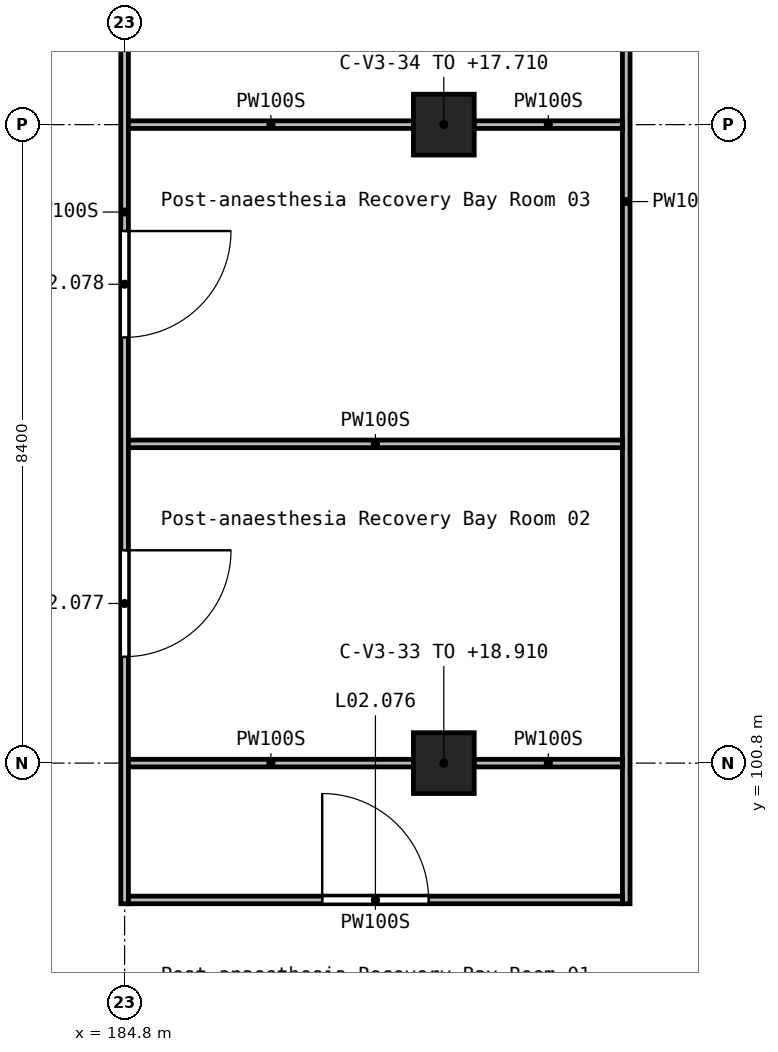
"""IFC4 building model, lengths in metres.
Left out: names, types, materials, properties, quantities, classifications, styles, units other than length and angle.
Written with IfcOpenShell. Run it as: python <this file> out.ifc"""

import sys

from ifc_helpers import new_model, si_unit, direction, frame, frame_2d, origin, origin_2d, place, context, subcontext, project, spatial, rectangle, extrude, element, fill, save


model = new_model("IFC4")
c1 = context("Model", 3, precision=1e-05, world=origin(), true_north=direction((0.0, 1.0)))
c2 = subcontext(c1, "Body", "Model", "MODEL_VIEW")
j1 = project(units=[si_unit("LENGTHUNIT", "METRE"), si_unit("PLANEANGLEUNIT", "RADIAN")], contexts=[c1])
p1 = place(None, origin())
s1 = spatial("IfcSite", under=j1, at=p1, CompositionType="ELEMENT")
p2 = place(p1, origin())
s2 = spatial("IfcBuilding", under=s1, at=p2, CompositionType="ELEMENT")
p3 = place(p2, frame((0.0, 0.0, 12.6)))
s3 = spatial("IfcBuildingStorey", under=s2, at=p3, CompositionType="ELEMENT", Elevation=12.6)
p4 = place(p3, frame((189.0, 100.8, 0.0), z_axis=(0.0, 0.0, 1.0), x_axis=(1.0, 0.0, 0.0)))
e1 = element("IfcColumn", 1, at=p4, inside=s3, PredefinedType="COLUMN", context=c2, shape_type="SweptSolid", body=[
    extrude(rectangle(XDim=0.8, YDim=0.8, at=origin_2d()), origin(), (0.0, 0.0, 1.0), 6.31),
])
p5 = place(p3, frame((189.0, 109.2, 0.0), z_axis=(0.0, 0.0, 1.0), x_axis=(1.0, 0.0, 0.0)))
e2 = element("IfcColumn", 2, at=p5, inside=s3, PredefinedType="COLUMN", context=c2, shape_type="SweptSolid", body=[
    extrude(rectangle(XDim=0.8, YDim=0.8, at=origin_2d()), origin(), (0.0, 0.0, 1.0), 5.11),
])
p6 = place(p3, frame((184.8, 117.15, 0.0), z_axis=(0.0, 0.0, 1.0), x_axis=(0.0, -1.0, 0.0)))
e3 = element("IfcWall", 3, at=p6, inside=s3, PredefinedType="PARTITIONING", context=c2, shape_type="SweptSolid", body=[
    extrude(rectangle(XDim=18.2, YDim=0.1, at=frame_2d((9.1, 0.0))), origin(), (0.0, 0.0, 1.0), 3.85),
])
p7 = place(p6, frame((13.55, 0.0, 0.0)))
e4 = element("IfcOpeningElement", 4, at=p7, cuts=e3, PredefinedType="OPENING", context=c2, shape_type="SweptSolid", body=[
    extrude(rectangle(XDim=1.4, YDim=2.1, at=frame_2d((0.7, 1.05))), frame((0.0, 0.06, 0.0), z_axis=(0.0, -1.0, 0.0), x_axis=(1.0, 0.0, 0.0)), (0.0, 0.0, 1.0), 0.12),
])
p8 = place(p6, frame((9.35, 0.0, 0.0)))
e5 = element("IfcOpeningElement", 5, at=p8, cuts=e3, PredefinedType="OPENING", context=c2, shape_type="SweptSolid", body=[
    extrude(rectangle(XDim=1.4, YDim=2.1, at=frame_2d((0.7, 1.05))), frame((0.0, 0.06, 0.0), z_axis=(0.0, -1.0, 0.0), x_axis=(1.0, 0.0, 0.0)), (0.0, 0.0, 1.0), 0.12),
])
p9 = place(p6, frame((5.4, 0.0, 0.0)))
e6 = element("IfcOpeningElement", 6, at=p9, cuts=e3, PredefinedType="OPENING", context=c2, shape_type="SweptSolid", body=[
    extrude(rectangle(XDim=0.9, YDim=2.1, at=frame_2d((0.45, 1.05))), frame((0.0, 0.06, 0.0), z_axis=(0.0, -1.0, 0.0), x_axis=(1.0, 0.0, 0.0)), (0.0, 0.0, 1.0), 0.12),
])
p10 = place(p6, frame((0.95, 0.0, 0.0)))
e7 = element("IfcOpeningElement", 7, at=p10, cuts=e3, PredefinedType="OPENING", context=c2, shape_type="SweptSolid", body=[
    extrude(rectangle(XDim=1.4, YDim=2.1, at=frame_2d((0.7, 1.05))), frame((0.0, 0.06, 0.0), z_axis=(0.0, -1.0, 0.0), x_axis=(1.0, 0.0, 0.0)), (0.0, 0.0, 1.0), 0.12),
])
p11 = place(p3, frame((191.4, 117.425, 0.0), z_axis=(0.0, 0.0, 1.0), x_axis=(0.0, -1.0, 0.0)))
e8 = element("IfcWall", 8, at=p11, inside=s3, PredefinedType="PARTITIONING", context=c2, shape_type="SweptSolid", body=[
    extrude(rectangle(XDim=18.475, YDim=0.1, at=frame_2d((9.238, 0.0))), origin(), (0.0, 0.0, 1.0), 3.85),
])
p12 = place(p3, frame((184.85, 99.0, 0.0), z_axis=(0.0, 0.0, 1.0), x_axis=(1.0, 0.0, 0.0)))
e9 = element("IfcWall", 9, at=p12, inside=s3, PredefinedType="PARTITIONING", context=c2, shape_type="SweptSolid", body=[
    extrude(rectangle(XDim=6.5, YDim=0.1, at=frame_2d((3.25, 0.0))), origin(), (0.0, 0.0, 1.0), 3.85),
])
p13 = place(p12, frame((2.55, 0.0, 0.0)))
e10 = element("IfcOpeningElement", 10, at=p13, cuts=e9, PredefinedType="OPENING", context=c2, shape_type="SweptSolid", body=[
    extrude(rectangle(XDim=1.4, YDim=2.1, at=frame_2d((0.7, 1.05))), frame((0.0, 0.06, 0.0), z_axis=(0.0, -1.0, 0.0), x_axis=(1.0, 0.0, 0.0)), (0.0, 0.0, 1.0), 0.12),
])
p14 = place(p3, frame((184.85, 100.8, 0.0), z_axis=(0.0, 0.0, 1.0), x_axis=(1.0, 0.0, 0.0)))
e11 = element("IfcWall", 11, at=p14, inside=s3, PredefinedType="PARTITIONING", context=c2, shape_type="SweptSolid", body=[
    extrude(rectangle(XDim=3.75, YDim=0.1, at=frame_2d((1.875, 0.0))), origin(), (0.0, 0.0, 1.0), 3.85),
])
p15 = place(p3, frame((189.4, 100.8, 0.0), z_axis=(0.0, 0.0, 1.0), x_axis=(1.0, 0.0, 0.0)))
e12 = element("IfcWall", 12, at=p15, inside=s3, PredefinedType="PARTITIONING", context=c2, shape_type="SweptSolid", body=[
    extrude(rectangle(XDim=1.95, YDim=0.1, at=frame_2d((0.975, 0.0))), origin(), (0.0, 0.0, 1.0), 3.85),
])
p16 = place(p3, frame((184.85, 105.0, 0.0), z_axis=(0.0, 0.0, 1.0), x_axis=(1.0, 0.0, 0.0)))
e13 = element("IfcWall", 13, at=p16, inside=s3, PredefinedType="PARTITIONING", context=c2, shape_type="SweptSolid", body=[
    extrude(rectangle(XDim=6.5, YDim=0.1, at=frame_2d((3.25, 0.0))), origin(), (0.0, 0.0, 1.0), 3.85),
])
p17 = place(p3, frame((184.85, 109.2, 0.0), z_axis=(0.0, 0.0, 1.0), x_axis=(1.0, 0.0, 0.0)))
e14 = element("IfcWall", 14, at=p17, inside=s3, PredefinedType="PARTITIONING", context=c2, shape_type="SweptSolid", body=[
    extrude(rectangle(XDim=3.75, YDim=0.1, at=frame_2d((1.875, 0.0))), origin(), (0.0, 0.0, 1.0), 3.85),
])
p18 = place(p3, frame((189.4, 109.2, 0.0), z_axis=(0.0, 0.0, 1.0), x_axis=(1.0, 0.0, 0.0)))
e15 = element("IfcWall", 15, at=p18, inside=s3, PredefinedType="PARTITIONING", context=c2, shape_type="SweptSolid", body=[
    extrude(rectangle(XDim=1.95, YDim=0.1, at=frame_2d((0.975, 0.0))), origin(), (0.0, 0.0, 1.0), 3.85),
])
p19 = place(p13, origin())
e16 = element("IfcDoor", 16, at=p19, inside=s3, OperationType="DOUBLE_DOOR_SINGLE_SWING", PredefinedType="DOOR", context=c2, shape_type="SweptSolid", body=[
    extrude(rectangle(XDim=1.4, YDim=2.1, at=frame_2d((0.7, 1.05))), frame((0.0, 0.025, 0.0), z_axis=(0.0, -1.0, 0.0), x_axis=(1.0, 0.0, 0.0)), (0.0, 0.0, 1.0), 0.05),
])
fill(e10, e16)
p20 = place(p7, origin())
e17 = element("IfcDoor", 17, at=p20, inside=s3, OperationType="DOUBLE_DOOR_SINGLE_SWING", PredefinedType="DOOR", context=c2, shape_type="SweptSolid", body=[
    extrude(rectangle(XDim=1.4, YDim=2.1, at=frame_2d((0.7, 1.05))), frame((0.0, 0.025, 0.0), z_axis=(0.0, -1.0, 0.0), x_axis=(1.0, 0.0, 0.0)), (0.0, 0.0, 1.0), 0.05),
])
fill(e4, e17)
p21 = place(p8, origin())
e18 = element("IfcDoor", 18, at=p21, inside=s3, OperationType="DOUBLE_DOOR_SINGLE_SWING", PredefinedType="DOOR", context=c2, shape_type="SweptSolid", body=[
    extrude(rectangle(XDim=1.4, YDim=2.1, at=frame_2d((0.7, 1.05))), frame((0.0, 0.025, 0.0), z_axis=(0.0, -1.0, 0.0), x_axis=(1.0, 0.0, 0.0)), (0.0, 0.0, 1.0), 0.05),
])
fill(e5, e18)
save(model, sys.argv[1])
